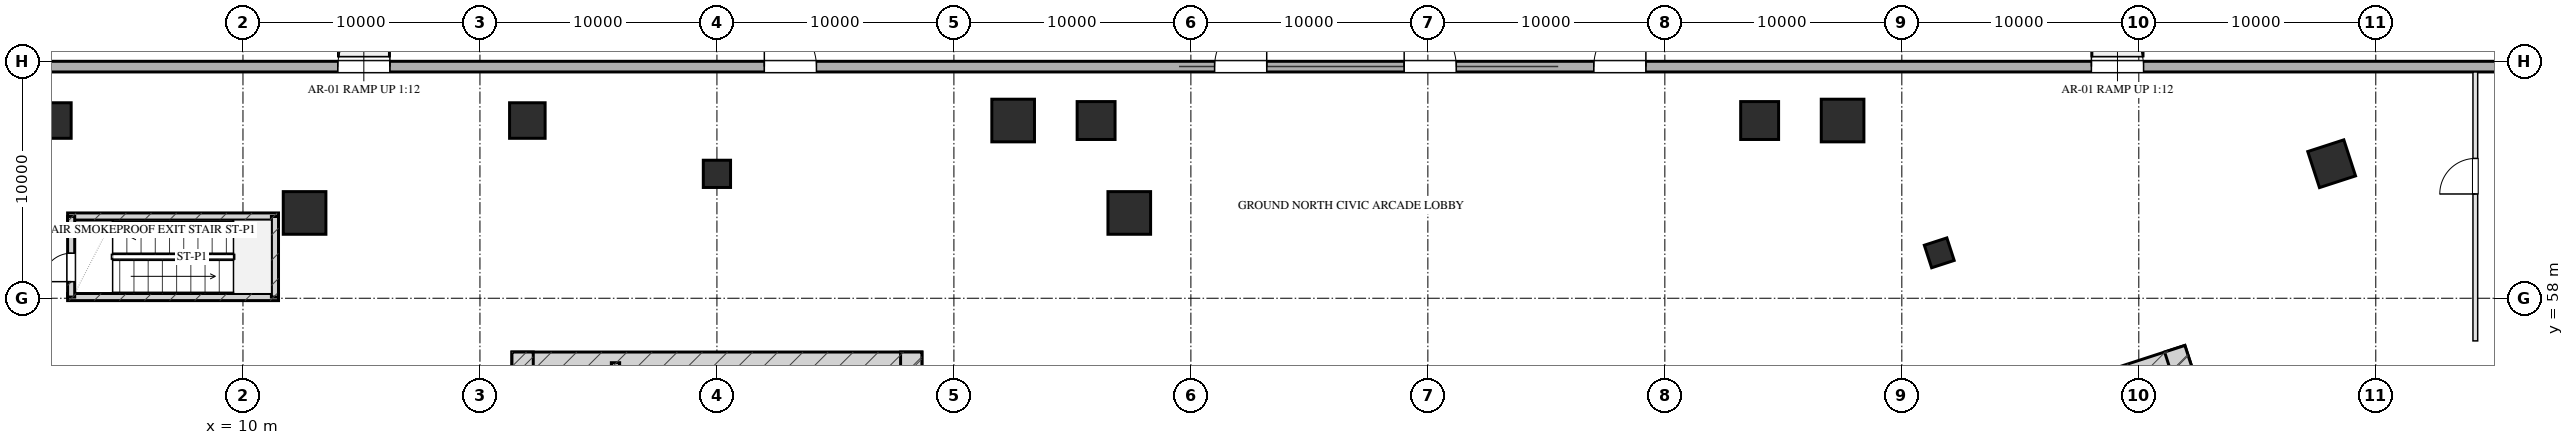
"""IFC4 building model, lengths in metres.
Left out: names, types, materials, properties, quantities, classifications, styles, units other than length and angle.
Written with IfcOpenShell. Run it as: python <this file> out.ifc"""

import sys

from ifc_helpers import new_model, si_unit, direction, frame, frame_2d, origin, origin_2d, place, context, subcontext, project, spatial, rectangle, hollow_rectangle, extrude, element, fill, save


model = new_model("IFC4")
c1 = context("Model", 3, precision=1e-05, world=origin(), true_north=direction((0.0, 1.0)))
c2 = subcontext(c1, "Body", "Model", "MODEL_VIEW")
j1 = project(units=[si_unit("LENGTHUNIT", "METRE"), si_unit("PLANEANGLEUNIT", "RADIAN")], contexts=[c1])
p1 = place(None, origin())
s1 = spatial("IfcSite", under=j1, at=p1, CompositionType="ELEMENT")
p2 = place(p1, origin())
s2 = spatial("IfcBuilding", under=s1, at=p2, CompositionType="ELEMENT")
p3 = place(p2, origin())
s3 = spatial("IfcBuildingStorey", under=s2, at=p3, CompositionType="ELEMENT", Elevation=0.0)
p4 = place(p3, frame((21.35, 55.28, 0.0), z_axis=(0.0, 0.0, 1.0), x_axis=(1.0, 0.0, 0.0)))
e1 = element("IfcWall", 1, at=p4, inside=s3, PredefinedType="SHEAR", context=c2, shape_type="SweptSolid", body=[
    extrude(rectangle(XDim=17.3, YDim=0.9, at=frame_2d((8.65, 0.0))), origin(), (0.0, 0.0, 1.0), 6.0),
])
for number, where, z_axis, x_axis in (
    (2, (21.8, 45.95, 0.0), (0.0, 0.0, 1.0), (0.0, 1.0, 0.0)),
    (3, (38.2, 45.95, 0.0), (0.0, 0.0, 1.0), (0.0, 1.0, 0.0)),
):
    element("IfcWall", number, at=place(p3, frame(where, z_axis=z_axis, x_axis=x_axis)), inside=s3, PredefinedType="SHEAR", context=c2, shape_type="SweptSolid", body=[
        extrude(rectangle(XDim=9.78, YDim=0.9, at=frame_2d((4.89, 0.0))), origin(), (0.0, 0.0, 1.0), 6.0),
    ])
p5 = place(p3, frame((25.72, 48.3, 0.0), z_axis=(0.0, 0.0, 1.0), x_axis=(0.0, 1.0, 0.0)))
e4 = element("IfcWall", 4, at=p5, inside=s3, PredefinedType="SHEAR", context=c2, shape_type="SweptSolid", body=[
    extrude(rectangle(XDim=6.98, YDim=0.35, at=frame_2d((3.49, 0.0))), origin(), (0.0, 0.0, 1.0), 6.0),
])
p6 = place(p3, frame((76.201, 50.419, 0.0), z_axis=(0.0, 0.0, 1.0), x_axis=(0.951056412142, 0.309017314926, 0.0)))
e5 = element("IfcWall", 5, at=p6, inside=s3, PredefinedType="SHEAR", context=c2, shape_type="SweptSolid", body=[
    extrude(rectangle(XDim=16.7, YDim=0.9, at=frame_2d((8.35, 0.0))), origin(), (0.0, 0.0, 1.0), 6.0),
])
p7 = place(p3, frame((94.539, 46.568, 0.0), z_axis=(0.0, 0.0, 1.0), x_axis=(-0.309021722829, 0.951054979914, 0.0)))
e6 = element("IfcWall", 6, at=p7, inside=s3, PredefinedType="SHEAR", context=c2, shape_type="SweptSolid", body=[
    extrude(rectangle(XDim=9.78, YDim=0.9, at=frame_2d((4.89, 0.0))), origin(), (0.0, 0.0, 1.0), 6.0),
])
for number, where, z_axis, x_axis in (
    (7, (2.6, 58.05, 0.0), (0.0, 0.0, 1.0), (1.0, 0.0, 0.0)),
    (8, (2.6, 61.45, 0.0), (0.0, 0.0, 1.0), (1.0, 0.0, 0.0)),
):
    element("IfcWall", number, at=place(p3, frame(where, z_axis=z_axis, x_axis=x_axis)), inside=s3, PredefinedType="SHEAR", context=c2, shape_type="SweptSolid", body=[
        extrude(rectangle(XDim=8.9, YDim=0.3, at=frame_2d((4.45, 0.0))), origin(), (0.0, 0.0, 1.0), 6.0),
    ])
p8 = place(p3, frame((11.35, 58.05, 0.0), z_axis=(0.0, 0.0, 1.0), x_axis=(0.0, 1.0, 0.0)))
e9 = element("IfcWall", 9, at=p8, inside=s3, PredefinedType="SHEAR", context=c2, shape_type="SweptSolid", body=[
    extrude(rectangle(XDim=3.4, YDim=0.3, at=frame_2d((1.7, 0.0))), origin(), (0.0, 0.0, 1.0), 6.0),
])
p9 = place(p3, frame((2.75, 58.05, 0.0), z_axis=(0.0, 0.0, 1.0), x_axis=(0.0, 1.0, 0.0)))
e10 = element("IfcWall", 10, at=p9, inside=s3, PredefinedType="SHEAR", context=c2, shape_type="SweptSolid", body=[
    extrude(rectangle(XDim=3.4, YDim=0.3, at=frame_2d((1.7, 0.0))), origin(), (0.0, 0.0, 1.0), 6.0),
])
p10 = place(p9, frame((0.65, 0.0, 0.0)))
e11 = element("IfcOpeningElement", 11, at=p10, cuts=e10, PredefinedType="OPENING", context=c2, shape_type="SweptSolid", body=[
    extrude(rectangle(XDim=1.2, YDim=2.05, at=frame_2d((0.6, 1.025))), frame((0.0, 0.16, 0.0), z_axis=(0.0, -1.0, 0.0), x_axis=(1.0, 0.0, 0.0)), (0.0, 0.0, 1.0), 0.32),
])
for number, where, z_axis, x_axis in (
    (12, (2.0, 65.5, 0.0), (0.0, 0.0, 1.0), (1.0, 0.0, 0.0)),
    (13, (22.0, 65.5, 0.0), (0.0, 0.0, 1.0), (1.0, 0.0, 0.0)),
):
    element("IfcColumn", number, at=place(p3, frame(where, z_axis=z_axis, x_axis=x_axis)), inside=s3, PredefinedType="COLUMN", context=c2, shape_type="SweptSolid", body=[
        extrude(rectangle(XDim=1.5, YDim=1.5, at=origin_2d()), origin(), (0.0, 0.0, 1.0), 6.001),
    ])
for number, where, z_axis, x_axis in (
    (14, (42.5, 65.5, 0.0), (0.0, 0.0, 1.0), (1.0, 0.0, 0.0)),
    (15, (77.5, 65.5, 0.0), (0.0, 0.0, 1.0), (1.0, 0.0, 0.0)),
):
    element("IfcColumn", number, at=place(p3, frame(where, z_axis=z_axis, x_axis=x_axis)), inside=s3, PredefinedType="COLUMN", context=c2, shape_type="SweptSolid", body=[
        extrude(hollow_rectangle(XDim=1.8, YDim=1.8, WallThickness=0.06, at=origin_2d()), origin(), (0.0, 0.0, 1.0), 6.001),
    ])
for number, where, z_axis, x_axis in (
    (16, (46.0, 65.5, 0.0), (0.0, 0.0, 1.0), (1.0, 0.0, 0.0)),
    (17, (74.0, 65.5, 0.0), (0.0, 0.0, 1.0), (1.0, 0.0, 0.0)),
):
    element("IfcColumn", number, at=place(p3, frame(where, z_axis=z_axis, x_axis=x_axis)), inside=s3, PredefinedType="COLUMN", context=c2, shape_type="SweptSolid", body=[
        extrude(hollow_rectangle(XDim=1.6, YDim=1.6, WallThickness=0.055, at=origin_2d()), origin(), (0.0, 0.0, 1.0), 6.001),
    ])
for number, where, z_axis, x_axis in (
    (18, (47.4, 61.6, 0.0), (0.0, 0.0, 1.0), (1.0, 0.0, 0.0)),
    (19, (12.6, 61.6, 0.0), (0.0, 0.0, 1.0), (1.0, 0.0, 0.0)),
):
    element("IfcColumn", number, at=place(p3, frame(where, z_axis=z_axis, x_axis=x_axis)), inside=s3, PredefinedType="COLUMN", context=c2, shape_type="SweptSolid", body=[
        extrude(hollow_rectangle(XDim=1.8, YDim=1.8, WallThickness=0.06, at=origin_2d()), origin(), (0.0, 0.0, 1.0), 6.001),
    ])
p11 = place(p3, frame((30.0, 63.25, 0.0), z_axis=(0.0, 0.0, 1.0), x_axis=(1.0, 0.0, 0.0)))
e20 = element("IfcColumn", 20, at=p11, inside=s3, PredefinedType="COLUMN", context=c2, shape_type="SweptSolid", body=[
    extrude(hollow_rectangle(XDim=1.15, YDim=1.15, WallThickness=0.04, at=origin_2d()), origin(), (0.0, 0.0, 1.0), 6.001),
])
p12 = place(p3, frame((98.137, 63.677, 0.0), z_axis=(0.0, 0.0, 1.0), x_axis=(0.951056516295, 0.309016994375, 0.0)))
e21 = element("IfcColumn", 21, at=p12, inside=s3, PredefinedType="COLUMN", context=c2, shape_type="SweptSolid", body=[
    extrude(hollow_rectangle(XDim=1.6, YDim=1.6, WallThickness=0.055, at=origin_2d()), origin(), (0.0, 0.0, 1.0), 6.001),
])
p13 = place(p3, frame((81.579, 59.916, 0.0), z_axis=(0.0, 0.0, 1.0), x_axis=(0.951056516295, 0.309016994375, 0.0)))
e22 = element("IfcColumn", 22, at=p13, inside=s3, PredefinedType="COLUMN", context=c2, shape_type="SweptSolid", body=[
    extrude(hollow_rectangle(XDim=1.0, YDim=1.0, WallThickness=0.036, at=origin_2d()), origin(), (0.0, 0.0, 1.0), 6.001),
])
p14 = place(p3, frame((0.0, 67.775, 0.0), z_axis=(0.0, 0.0, 1.0), x_axis=(1.0, 0.0, 0.0)))
e23 = element("IfcWall", 23, at=p14, inside=s3, PredefinedType="SOLIDWALL", context=c2, shape_type="SweptSolid", body=[
    extrude(rectangle(XDim=120.0, YDim=0.45, at=frame_2d((60.0, 0.0))), origin(), (0.0, 0.0, 1.0), 5.7),
])
p15 = place(p14, frame((14.0, 0.0, 0.0)))
e24 = element("IfcOpeningElement", 24, at=p15, cuts=e23, PredefinedType="OPENING", context=c2, shape_type="SweptSolid", body=[
    extrude(rectangle(XDim=2.2, YDim=2.4, at=frame_2d((1.1, 1.2))), frame((0.0, 0.235, 0.0), z_axis=(0.0, -1.0, 0.0), x_axis=(1.0, 0.0, 0.0)), (0.0, 0.0, 1.0), 0.47),
])
p16 = place(p14, frame((32.0, 0.0, 0.0)))
e25 = element("IfcOpeningElement", 25, at=p16, cuts=e23, PredefinedType="OPENING", context=c2, shape_type="SweptSolid", body=[
    extrude(rectangle(XDim=2.2, YDim=2.4, at=frame_2d((1.1, 1.2))), frame((0.0, 0.235, 0.0), z_axis=(0.0, -1.0, 0.0), x_axis=(1.0, 0.0, 0.0)), (0.0, 0.0, 1.0), 0.47),
])
p17 = place(p14, frame((51.0, 0.0, 0.0)))
e26 = element("IfcOpeningElement", 26, at=p17, cuts=e23, PredefinedType="OPENING", context=c2, shape_type="SweptSolid", body=[
    extrude(rectangle(XDim=2.2, YDim=2.4, at=frame_2d((1.1, 1.2))), frame((0.0, 0.235, 0.0), z_axis=(0.0, -1.0, 0.0), x_axis=(1.0, 0.0, 0.0)), (0.0, 0.0, 1.0), 0.47),
])
p18 = place(p14, frame((59.0, 0.0, 0.0)))
e27 = element("IfcOpeningElement", 27, at=p18, cuts=e23, PredefinedType="OPENING", context=c2, shape_type="SweptSolid", body=[
    extrude(rectangle(XDim=2.2, YDim=2.4, at=frame_2d((1.1, 1.2))), frame((0.0, 0.235, 0.0), z_axis=(0.0, -1.0, 0.0), x_axis=(1.0, 0.0, 0.0)), (0.0, 0.0, 1.0), 0.47),
])
p19 = place(p14, frame((67.0, 0.0, 0.0)))
e28 = element("IfcOpeningElement", 28, at=p19, cuts=e23, PredefinedType="OPENING", context=c2, shape_type="SweptSolid", body=[
    extrude(rectangle(XDim=2.2, YDim=2.4, at=frame_2d((1.1, 1.2))), frame((0.0, 0.235, 0.0), z_axis=(0.0, -1.0, 0.0), x_axis=(1.0, 0.0, 0.0)), (0.0, 0.0, 1.0), 0.47),
])
p20 = place(p14, frame((88.0, 0.0, 0.0)))
e29 = element("IfcOpeningElement", 29, at=p20, cuts=e23, PredefinedType="OPENING", context=c2, shape_type="SweptSolid", body=[
    extrude(rectangle(XDim=2.2, YDim=2.4, at=frame_2d((1.1, 1.2))), frame((0.0, 0.235, 0.0), z_axis=(0.0, -1.0, 0.0), x_axis=(1.0, 0.0, 0.0)), (0.0, 0.0, 1.0), 0.47),
])
p21 = place(p14, frame((112.0, 0.0, 0.0)))
e30 = element("IfcOpeningElement", 30, at=p21, cuts=e23, PredefinedType="OPENING", context=c2, shape_type="SweptSolid", body=[
    extrude(rectangle(XDim=2.2, YDim=2.4, at=frame_2d((1.1, 1.2))), frame((0.0, 0.235, 0.0), z_axis=(0.0, -1.0, 0.0), x_axis=(1.0, 0.0, 0.0)), (0.0, 0.0, 1.0), 0.47),
])
p22 = place(p3, frame((104.2, 56.2, 0.0), z_axis=(0.0, 0.0, 1.0), x_axis=(0.0, 1.0, 0.0)))
e31 = element("IfcWall", 31, at=p22, inside=s3, PredefinedType="PARTITIONING", context=c2, shape_type="SweptSolid", body=[
    extrude(rectangle(XDim=11.35, YDim=0.2, at=frame_2d((5.675, 0.0))), origin(), (0.0, 0.0, 1.0), 5.685),
])
p23 = place(p22, frame((6.2, 0.0, 0.0)))
e32 = element("IfcOpeningElement", 32, at=p23, cuts=e31, PredefinedType="OPENING", context=c2, shape_type="SweptSolid", body=[
    extrude(rectangle(XDim=1.5, YDim=2.05, at=frame_2d((0.75, 1.025))), frame((0.0, 0.11, 0.0), z_axis=(0.0, -1.0, 0.0), x_axis=(1.0, 0.0, 0.0)), (0.0, 0.0, 1.0), 0.22),
])
p24 = place(p15, origin())
e33 = element("IfcDoor", 33, at=p24, inside=s3, OperationType="SINGLE_SWING_RIGHT", PredefinedType="DOOR", context=c2, shape_type="SweptSolid", body=[
    extrude(rectangle(XDim=2.2, YDim=2.4, at=frame_2d((1.1, 1.2))), frame((0.0, 0.025, 0.0), z_axis=(0.0, -1.0, 0.0), x_axis=(1.0, 0.0, 0.0)), (0.0, 0.0, 1.0), 0.05),
])
fill(e24, e33)
p25 = place(p16, origin())
e34 = element("IfcDoor", 34, at=p25, inside=s3, OperationType="SINGLE_SWING_LEFT", PredefinedType="DOOR", context=c2, shape_type="SweptSolid", body=[
    extrude(rectangle(XDim=2.2, YDim=2.4, at=frame_2d((1.1, 1.2))), frame((0.0, 0.025, 0.0), z_axis=(0.0, -1.0, 0.0), x_axis=(1.0, 0.0, 0.0)), (0.0, 0.0, 1.0), 0.05),
])
fill(e25, e34)
p26 = place(p17, origin())
e35 = element("IfcDoor", 35, at=p26, inside=s3, OperationType="SINGLE_SWING_RIGHT", PredefinedType="DOOR", context=c2, shape_type="SweptSolid", body=[
    extrude(rectangle(XDim=2.2, YDim=2.4, at=frame_2d((1.1, 1.2))), frame((0.0, 0.025, 0.0), z_axis=(0.0, -1.0, 0.0), x_axis=(1.0, 0.0, 0.0)), (0.0, 0.0, 1.0), 0.05),
])
fill(e26, e35)
p27 = place(p18, origin())
e36 = element("IfcDoor", 36, at=p27, inside=s3, OperationType="SINGLE_SWING_LEFT", PredefinedType="DOOR", context=c2, shape_type="SweptSolid", body=[
    extrude(rectangle(XDim=2.2, YDim=2.4, at=frame_2d((1.1, 1.2))), frame((0.0, 0.025, 0.0), z_axis=(0.0, -1.0, 0.0), x_axis=(1.0, 0.0, 0.0)), (0.0, 0.0, 1.0), 0.05),
])
fill(e27, e36)
p28 = place(p19, origin())
e37 = element("IfcDoor", 37, at=p28, inside=s3, OperationType="SINGLE_SWING_RIGHT", PredefinedType="DOOR", context=c2, shape_type="SweptSolid", body=[
    extrude(rectangle(XDim=2.2, YDim=2.4, at=frame_2d((1.1, 1.2))), frame((0.0, 0.025, 0.0), z_axis=(0.0, -1.0, 0.0), x_axis=(1.0, 0.0, 0.0)), (0.0, 0.0, 1.0), 0.05),
])
fill(e28, e37)
p29 = place(p20, origin())
e38 = element("IfcDoor", 38, at=p29, inside=s3, OperationType="SINGLE_SWING_LEFT", PredefinedType="DOOR", context=c2, shape_type="SweptSolid", body=[
    extrude(rectangle(XDim=2.2, YDim=2.4, at=frame_2d((1.1, 1.2))), frame((0.0, 0.025, 0.0), z_axis=(0.0, -1.0, 0.0), x_axis=(1.0, 0.0, 0.0)), (0.0, 0.0, 1.0), 0.05),
])
fill(e29, e38)
p30 = place(p23, origin())
e39 = element("IfcDoor", 39, at=p30, inside=s3, OperationType="SINGLE_SWING_LEFT", PredefinedType="DOOR", context=c2, shape_type="SweptSolid", body=[
    extrude(rectangle(XDim=1.5, YDim=2.05, at=frame_2d((0.75, 1.025))), frame((0.0, 0.025, 0.0), z_axis=(0.0, -1.0, 0.0), x_axis=(1.0, 0.0, 0.0)), (0.0, 0.0, 1.0), 0.05),
])
fill(e32, e39)
p31 = place(p10, origin())
e40 = element("IfcDoor", 40, at=p31, inside=s3, OperationType="SINGLE_SWING_LEFT", PredefinedType="DOOR", context=c2, shape_type="SweptSolid", body=[
    extrude(rectangle(XDim=1.2, YDim=2.05, at=frame_2d((0.6, 1.025))), frame((0.0, 0.025, 0.0), z_axis=(0.0, -1.0, 0.0), x_axis=(1.0, 0.0, 0.0)), (0.0, 0.0, 1.0), 0.05),
])
fill(e11, e40)
save(model, sys.argv[1])
